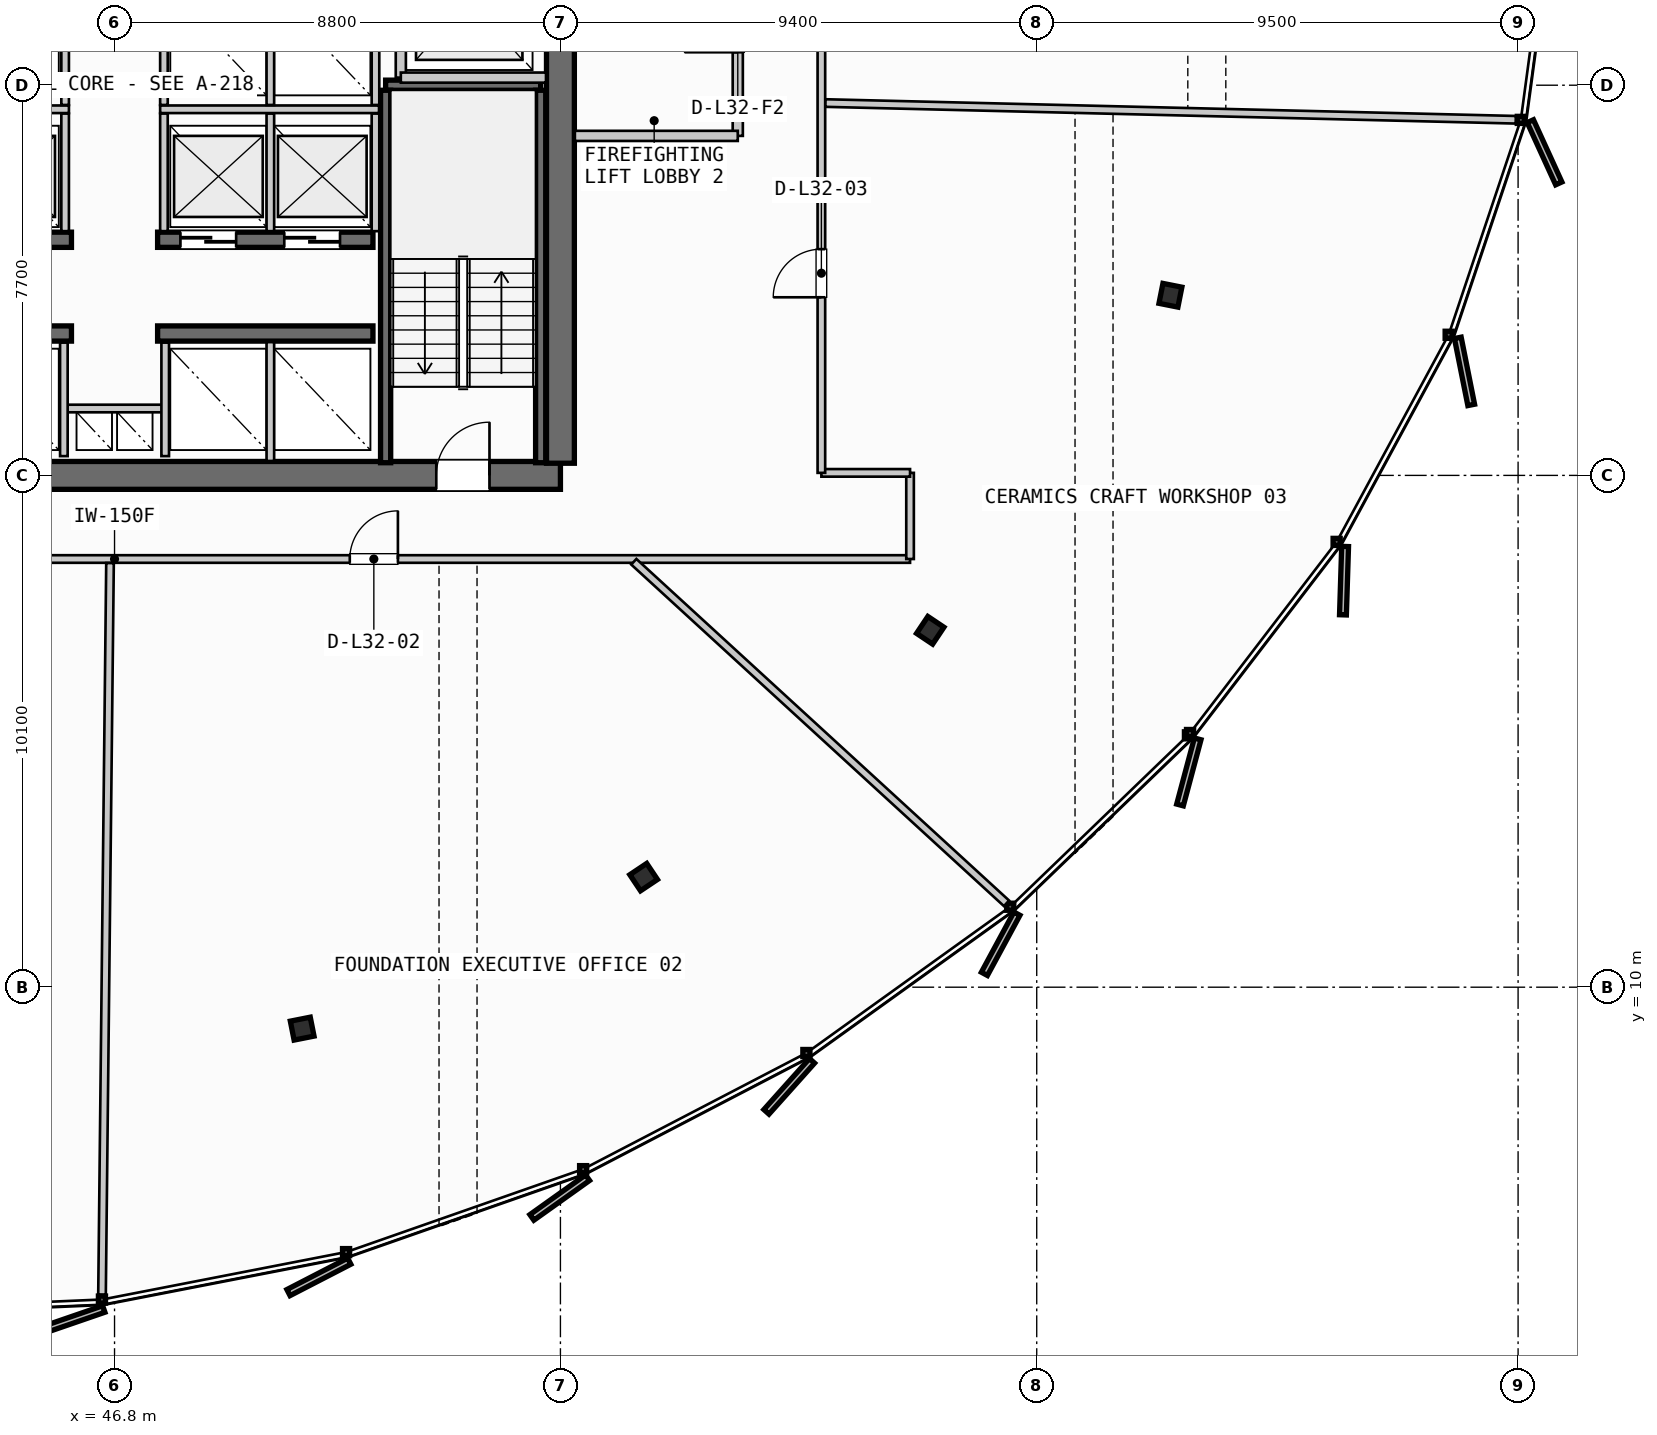
"""IFC4 building model, lengths in metres.
Left out: names, types, materials, properties, quantities, classifications, styles, units other than length and angle.
Written with IfcOpenShell. Run it as: python <this file> out.ifc"""

import sys

from ifc_helpers import new_model, si_unit, direction, frame, frame_2d, origin, origin_2d, place, context, subcontext, project, spatial, rectangle, i_section, extrude, source, transform, mapped, element, fill, save


model = new_model("IFC4")
c1 = context("Model", 3, precision=1e-05, world=origin(), true_north=direction((0.0, 1.0)))
c2 = subcontext(c1, "Body", "Model", "MODEL_VIEW")
j1 = project(units=[si_unit("LENGTHUNIT", "METRE"), si_unit("PLANEANGLEUNIT", "RADIAN")], contexts=[c1])
p1 = place(None, origin())
s1 = spatial("IfcSite", under=j1, at=p1, CompositionType="ELEMENT")
p2 = place(p1, origin())
s2 = spatial("IfcBuilding", under=s1, at=p2, CompositionType="ELEMENT")
p3 = place(p2, frame((0.0, 0.0, 128.8)))
s3 = spatial("IfcBuildingStorey", under=s2, at=p3, CompositionType="ELEMENT", Elevation=128.8)
p4 = place(p3, frame((38.0, 20.1, 0.0), z_axis=(0.0, 0.0, 1.0), x_axis=(1.0, 0.0, 0.0)))
e1 = element("IfcWall", 1, at=p4, inside=s3, PredefinedType="SHEAR", context=c2, shape_type="SweptSolid", body=[
    extrude(rectangle(XDim=17.6, YDim=0.55, at=frame_2d((8.8, 0.0))), origin(), (0.0, 0.0, 1.0), 3.3),
])
p5 = place(p4, frame((1.4, 0.0, 0.0)))
e2 = element("IfcOpeningElement", 2, at=p5, cuts=e1, PredefinedType="OPENING", context=c2, shape_type="SweptSolid", body=[
    extrude(rectangle(XDim=1.05, YDim=2.15, at=frame_2d((0.525, 1.075))), frame((0.0, 0.285, 0.0), z_axis=(0.0, -1.0, 0.0), x_axis=(1.0, 0.0, 0.0)), (0.0, 0.0, 1.0), 0.57),
])
p6 = place(p4, frame((15.15, 0.0, 0.0)))
e3 = element("IfcOpeningElement", 3, at=p6, cuts=e1, PredefinedType="OPENING", context=c2, shape_type="SweptSolid", body=[
    extrude(rectangle(XDim=1.05, YDim=2.15, at=frame_2d((0.525, 1.075))), frame((0.0, 0.285, 0.0), z_axis=(0.0, -1.0, 0.0), x_axis=(1.0, 0.0, 0.0)), (0.0, 0.0, 1.0), 0.57),
])
p7 = place(p3, frame((55.6, 20.34, 0.0), z_axis=(0.0, 0.0, 1.0), x_axis=(0.0, 1.0, 0.0)))
e4 = element("IfcWall", 4, at=p7, inside=s3, PredefinedType="SHEAR", context=c2, shape_type="SweptSolid", body=[
    extrude(rectangle(XDim=14.92, YDim=0.55, at=frame_2d((7.46, 0.0))), origin(), (0.0, 0.0, 1.0), 3.3),
])
p8 = place(p7, frame((12.71, 0.0, 0.0)))
e5 = element("IfcOpeningElement", 5, at=p8, cuts=e4, PredefinedType="OPENING", context=c2, shape_type="SweptSolid", body=[
    extrude(rectangle(XDim=1.05, YDim=2.15, at=frame_2d((0.525, 1.075))), frame((0.0, 0.285, 0.0), z_axis=(0.0, -1.0, 0.0), x_axis=(1.0, 0.0, 0.0)), (0.0, 0.0, 1.0), 0.57),
])
p9 = place(p7, frame((8.61, 0.0, 0.0)))
e6 = element("IfcOpeningElement", 6, at=p9, cuts=e4, PredefinedType="OPENING", context=c2, shape_type="SweptSolid", body=[
    extrude(rectangle(XDim=1.1, YDim=2.2, at=frame_2d((0.55, 1.1))), frame((0.0, 0.285, 0.0), z_axis=(0.0, -1.0, 0.0), x_axis=(1.0, 0.0, 0.0)), (0.0, 0.0, 1.0), 0.57),
])
for number, where, z_axis, x_axis in (
    (7, (41.7, 22.9, 0.0), (0.0, 0.0, 1.0), (1.0, 0.0, 0.0)),
    (8, (47.65, 22.9, 0.0), (0.0, 0.0, 1.0), (1.0, 0.0, 0.0)),
):
    element("IfcWall", number, at=place(p3, frame(where, z_axis=z_axis, x_axis=x_axis)), inside=s3, PredefinedType="SHEAR", context=c2, shape_type="SweptSolid", body=[
        extrude(rectangle(XDim=4.25, YDim=0.3, at=frame_2d((2.125, 0.0))), origin(), (0.0, 0.0, 1.0), 3.3),
    ])
p10 = place(p3, frame((41.7, 24.75, 0.0), z_axis=(0.0, 0.0, 1.0), x_axis=(1.0, 0.0, 0.0)))
e9 = element("IfcWall", 9, at=p10, inside=s3, PredefinedType="SHEAR", context=c2, shape_type="SweptSolid", body=[
    extrude(rectangle(XDim=4.25, YDim=0.3, at=frame_2d((2.125, 0.0))), origin(), (0.0, 0.0, 1.0), 3.3),
])
p11 = place(p10, frame((0.45, 0.0, 0.0)))
e10 = element("IfcOpeningElement", 10, at=p11, cuts=e9, PredefinedType="OPENING", context=c2, shape_type="SweptSolid", body=[
    extrude(rectangle(XDim=1.1, YDim=2.2, at=frame_2d((0.55, 1.1))), frame((0.0, 0.16, 0.0), z_axis=(0.0, -1.0, 0.0), x_axis=(1.0, 0.0, 0.0)), (0.0, 0.0, 1.0), 0.32),
])
p12 = place(p10, frame((2.5, 0.0, 0.0)))
e11 = element("IfcOpeningElement", 11, at=p12, cuts=e9, PredefinedType="OPENING", context=c2, shape_type="SweptSolid", body=[
    extrude(rectangle(XDim=1.1, YDim=2.2, at=frame_2d((0.55, 1.1))), frame((0.0, 0.16, 0.0), z_axis=(0.0, -1.0, 0.0), x_axis=(1.0, 0.0, 0.0)), (0.0, 0.0, 1.0), 0.32),
])
p13 = place(p3, frame((47.65, 24.75, 0.0), z_axis=(0.0, 0.0, 1.0), x_axis=(1.0, 0.0, 0.0)))
e12 = element("IfcWall", 12, at=p13, inside=s3, PredefinedType="SHEAR", context=c2, shape_type="SweptSolid", body=[
    extrude(rectangle(XDim=4.25, YDim=0.3, at=frame_2d((2.125, 0.0))), origin(), (0.0, 0.0, 1.0), 3.3),
])
p14 = place(p13, frame((0.45, 0.0, 0.0)))
e13 = element("IfcOpeningElement", 13, at=p14, cuts=e12, PredefinedType="OPENING", context=c2, shape_type="SweptSolid", body=[
    extrude(rectangle(XDim=1.1, YDim=2.2, at=frame_2d((0.55, 1.1))), frame((0.0, 0.16, 0.0), z_axis=(0.0, -1.0, 0.0), x_axis=(1.0, 0.0, 0.0)), (0.0, 0.0, 1.0), 0.32),
])
p15 = place(p13, frame((2.5, 0.0, 0.0)))
e14 = element("IfcOpeningElement", 14, at=p15, cuts=e12, PredefinedType="OPENING", context=c2, shape_type="SweptSolid", body=[
    extrude(rectangle(XDim=1.1, YDim=2.2, at=frame_2d((0.55, 1.1))), frame((0.0, 0.16, 0.0), z_axis=(0.0, -1.0, 0.0), x_axis=(1.0, 0.0, 0.0)), (0.0, 0.0, 1.0), 0.32),
])
m1 = source(origin(), c2, "Body", "SweptSolid", [
    extrude(i_section(OverallWidth=0.401, OverallDepth=0.381, WebThickness=0.032, FlangeThickness=0.051, FilletRadius=0.015, at=origin_2d()), origin(), (0.0, 0.0, 1.0), 3.3),
])
for number, where, z_axis, x_axis in (
    (15, (50.503, 9.182, 0.0), (0.0, 0.0, 1.0), (0.195, -0.981, 0.0)),
    (16, (57.242, 12.172, 0.0), (0.0, 0.0, 1.0), (0.556, -0.831, 0.0)),
    (17, (62.899, 17.043, 0.0), (0.0, 0.0, 1.0), (0.831, -0.556, 0.0)),
    (18, (67.639, 23.655, 0.0), (0.0, 0.0, 1.0), (0.981, -0.195, 0.0)),
):
    element("IfcColumn", number, at=place(p3, frame(where, z_axis=z_axis, x_axis=x_axis)), inside=s3, PredefinedType="COLUMN", context=c2, shape_type="MappedRepresentation", body=[
        mapped(m1, transform((0.0, 0.0, 0.0), scale=1.0)),
    ])
p16 = place(p3, frame((52.15, 27.8, 0.0), z_axis=(0.0, 0.0, 1.0), x_axis=(1.0, 0.0, 0.0)))
e19 = element("IfcWall", 19, at=p16, inside=s3, PredefinedType="SHEAR", context=c2, shape_type="SweptSolid", body=[
    extrude(rectangle(XDim=3.06, YDim=0.2, at=frame_2d((1.53, 0.0))), origin(), (0.0, 0.0, 1.0), 3.3),
])
for number, where, z_axis, x_axis in (
    (20, (55.21, 27.7, 0.0), (0.0, 0.0, 1.0), (0.0, -1.0, 0.0)),
    (21, (52.15, 20.35, 0.0), (0.0, 0.0, 1.0), (0.0, 1.0, 0.0)),
):
    element("IfcWall", number, at=place(p3, frame(where, z_axis=z_axis, x_axis=x_axis)), inside=s3, PredefinedType="SHEAR", context=c2, shape_type="SweptSolid", body=[
        extrude(rectangle(XDim=7.35, YDim=0.2, at=frame_2d((3.675, 0.0))), origin(), (0.0, 0.0, 1.0), 3.3),
    ])
p17 = place(p3, frame((45.8, 21.42, 0.0), z_axis=(0.0, 0.0, 1.0), x_axis=(1.0, 0.0, 0.0)))
e22 = element("IfcWall", 22, at=p17, inside=s3, PredefinedType="PARTITIONING", context=c2, shape_type="SweptSolid", body=[
    extrude(rectangle(XDim=2.0, YDim=0.15, at=frame_2d((1.0, 0.0))), origin(), (0.0, 0.0, 1.0), 2.445),
])
for number, where, z_axis, x_axis in (
    (23, (45.8, 20.48, 0.0), (0.0, 0.0, 1.0), (0.0, 1.0, 0.0)),
    (24, (47.8, 20.48, 0.0), (0.0, 0.0, 1.0), (0.0, 1.0, 0.0)),
):
    element("IfcWall", number, at=place(p3, frame(where, z_axis=z_axis, x_axis=x_axis)), inside=s3, PredefinedType="PARTITIONING", context=c2, shape_type="SweptSolid", body=[
        extrude(rectangle(XDim=2.24, YDim=0.15, at=frame_2d((1.12, 0.0))), origin(), (0.0, 0.0, 1.0), 2.445),
    ])
p18 = place(p3, frame((52.45, 27.95, 0.0), z_axis=(0.0, 0.0, 1.0), x_axis=(0.0, 1.0, 0.0)))
e25 = element("IfcWall", 25, at=p18, inside=s3, PredefinedType="PARTITIONING", context=c2, shape_type="SweptSolid", body=[
    extrude(rectangle(XDim=3.1, YDim=0.2, at=frame_2d((1.55, 0.0))), origin(), (0.0, 0.0, 1.0), 2.445),
])
p19 = place(p3, frame((52.45, 27.95, 0.0), z_axis=(0.0, 0.0, 1.0), x_axis=(1.0, 0.0, 0.0)))
e26 = element("IfcWall", 26, at=p19, inside=s3, PredefinedType="PARTITIONING", context=c2, shape_type="SweptSolid", body=[
    extrude(rectangle(XDim=2.865, YDim=0.2, at=frame_2d((1.433, 0.0))), origin(), (0.0, 0.0, 1.0), 2.445),
])
p20 = place(p3, frame((59.1, 26.8, 0.0), z_axis=(0.0, 0.0, 1.0), x_axis=(0.0, 1.0, 0.0)))
e27 = element("IfcWall", 27, at=p20, inside=s3, PredefinedType="PARTITIONING", context=c2, shape_type="SweptSolid", body=[
    extrude(rectangle(XDim=4.4, YDim=0.2, at=frame_2d((2.2, 0.0))), origin(), (0.0, 0.0, 1.0), 2.445),
])
p21 = place(p20, frame((1.65, 0.0, 0.0)))
e28 = element("IfcOpeningElement", 28, at=p21, cuts=e27, PredefinedType="OPENING", context=c2, shape_type="SweptSolid", body=[
    extrude(rectangle(XDim=1.05, YDim=2.15, at=frame_2d((0.525, 1.075))), frame((0.0, 0.11, 0.0), z_axis=(0.0, -1.0, 0.0), x_axis=(1.0, 0.0, 0.0)), (0.0, 0.0, 1.0), 0.22),
])
p22 = place(p3, frame((55.885, 26.8, 0.0), z_axis=(0.0, 0.0, 1.0), x_axis=(1.0, 0.0, 0.0)))
e29 = element("IfcWall", 29, at=p22, inside=s3, PredefinedType="PARTITIONING", context=c2, shape_type="SweptSolid", body=[
    extrude(rectangle(XDim=3.215, YDim=0.2, at=frame_2d((1.607, 0.0))), origin(), (0.0, 0.0, 1.0), 2.445),
])
p23 = place(p3, frame((49.875, 20.385, 0.0), z_axis=(0.0, 0.0, 1.0), x_axis=(0.0, 1.0, 0.0)))
e30 = element("IfcWall", 30, at=p23, inside=s3, PredefinedType="PARTITIONING", context=c2, shape_type="SweptSolid", body=[
    extrude(rectangle(XDim=2.345, YDim=0.15, at=frame_2d((1.172, 0.0))), origin(), (0.0, 0.0, 1.0), 2.445),
])
p24 = place(p3, frame((41.58, 27.325, 0.0), z_axis=(0.0, 0.0, 1.0), x_axis=(1.0, 0.0, 0.0)))
e31 = element("IfcWall", 31, at=p24, inside=s3, PredefinedType="PARTITIONING", context=c2, shape_type="SweptSolid", body=[
    extrude(rectangle(XDim=4.32, YDim=0.15, at=frame_2d((2.16, 0.0))), origin(), (0.0, 0.0, 1.0), 2.445),
])
p25 = place(p3, frame((47.7, 27.325, 0.0), z_axis=(0.0, 0.0, 1.0), x_axis=(1.0, 0.0, 0.0)))
e32 = element("IfcWall", 32, at=p25, inside=s3, PredefinedType="PARTITIONING", context=c2, shape_type="SweptSolid", body=[
    extrude(rectangle(XDim=4.32, YDim=0.15, at=frame_2d((2.16, 0.0))), origin(), (0.0, 0.0, 1.0), 2.445),
])
for number, where, z_axis, x_axis in (
    (33, (45.825, 24.92, 0.0), (0.0, 0.0, 1.0), (0.0, 1.0, 0.0)),
    (34, (47.775, 24.92, 0.0), (0.0, 0.0, 1.0), (0.0, 1.0, 0.0)),
    (35, (49.875, 24.92, 0.0), (0.0, 0.0, 1.0), (0.0, 1.0, 0.0)),
    (36, (51.95, 24.92, 0.0), (0.0, 0.0, 1.0), (0.0, 1.0, 0.0)),
):
    element("IfcWall", number, at=place(p3, frame(where, z_axis=z_axis, x_axis=x_axis)), inside=s3, PredefinedType="PARTITIONING", context=c2, shape_type="SweptSolid", body=[
        extrude(rectangle(XDim=2.32, YDim=0.15, at=frame_2d((1.16, 0.0))), origin(), (0.0, 0.0, 1.0), 2.445),
    ])
for number, where, z_axis, x_axis in (
    (37, (45.825, 27.41, 0.0), (0.0, 0.0, 1.0), (0.0, 1.0, 0.0)),
    (38, (47.775, 27.41, 0.0), (0.0, 0.0, 1.0), (0.0, 1.0, 0.0)),
    (39, (49.875, 27.41, 0.0), (0.0, 0.0, 1.0), (0.0, 1.0, 0.0)),
    (40, (51.95, 27.41, 0.0), (0.0, 0.0, 1.0), (0.0, 1.0, 0.0)),
):
    element("IfcWall", number, at=place(p3, frame(where, z_axis=z_axis, x_axis=x_axis)), inside=s3, PredefinedType="PARTITIONING", context=c2, shape_type="SweptSolid", body=[
        extrude(rectangle(XDim=2.27, YDim=0.15, at=frame_2d((1.135, 0.0))), origin(), (0.0, 0.0, 1.0), 2.445),
    ])
p26 = place(p3, frame((31.1, 18.45, 0.0), z_axis=(0.0, 0.0, 1.0), x_axis=(1.0, 0.0, 0.0)))
e41 = element("IfcWall", 41, at=p26, inside=s3, PredefinedType="PARTITIONING", context=c2, shape_type="SweptSolid", body=[
    extrude(rectangle(XDim=31.4, YDim=0.15, at=frame_2d((15.7, 0.0))), origin(), (0.0, 0.0, 1.0), 2.445),
])
p27 = place(p26, frame((9.534, 0.0, 0.0)))
e42 = element("IfcOpeningElement", 42, at=p27, cuts=e41, PredefinedType="OPENING", context=c2, shape_type="SweptSolid", body=[
    extrude(rectangle(XDim=0.95, YDim=2.15, at=frame_2d((0.475, 1.075))), frame((0.0, 0.085, 0.0), z_axis=(0.0, -1.0, 0.0), x_axis=(1.0, 0.0, 0.0)), (0.0, 0.0, 1.0), 0.17),
])
p28 = place(p26, frame((20.343, 0.0, 0.0)))
e43 = element("IfcOpeningElement", 43, at=p28, cuts=e41, PredefinedType="OPENING", context=c2, shape_type="SweptSolid", body=[
    extrude(rectangle(XDim=0.95, YDim=2.15, at=frame_2d((0.475, 1.075))), frame((0.0, 0.085, 0.0), z_axis=(0.0, -1.0, 0.0), x_axis=(1.0, 0.0, 0.0)), (0.0, 0.0, 1.0), 0.17),
])
p29 = place(p3, frame((62.5, 18.45, 0.0), z_axis=(0.0, 0.0, 1.0), x_axis=(0.0, 1.0, 0.0)))
e44 = element("IfcWall", 44, at=p29, inside=s3, PredefinedType="PARTITIONING", context=c2, shape_type="SweptSolid", body=[
    extrude(rectangle(XDim=1.7, YDim=0.15, at=frame_2d((0.85, 0.0))), origin(), (0.0, 0.0, 1.0), 2.445),
])
p30 = place(p3, frame((62.5, 20.15, 0.0), z_axis=(0.0, 0.0, 1.0), x_axis=(-1.0, 0.0, 0.0)))
e45 = element("IfcWall", 45, at=p30, inside=s3, PredefinedType="PARTITIONING", context=c2, shape_type="SweptSolid", body=[
    extrude(rectangle(XDim=1.75, YDim=0.15, at=frame_2d((0.875, 0.0))), origin(), (0.0, 0.0, 1.0), 2.445),
])
p31 = place(p3, frame((60.75, 20.15, 0.0), z_axis=(0.0, 0.0, 1.0), x_axis=(0.0, 1.0, 0.0)))
e46 = element("IfcWall", 46, at=p31, inside=s3, PredefinedType="PARTITIONING", context=c2, shape_type="SweptSolid", body=[
    extrude(rectangle(XDim=15.3, YDim=0.15, at=frame_2d((7.65, 0.0))), origin(), (0.0, 0.0, 1.0), 2.445),
])
p32 = place(p31, frame((3.465, 0.0, 0.0)))
e47 = element("IfcOpeningElement", 47, at=p32, cuts=e46, PredefinedType="OPENING", context=c2, shape_type="SweptSolid", body=[
    extrude(rectangle(XDim=0.95, YDim=2.15, at=frame_2d((0.475, 1.075))), frame((0.0, 0.085, 0.0), z_axis=(0.0, -1.0, 0.0), x_axis=(1.0, 0.0, 0.0)), (0.0, 0.0, 1.0), 0.17),
])
p33 = place(p31, frame((10.535, 0.0, 0.0)))
e48 = element("IfcOpeningElement", 48, at=p33, cuts=e46, PredefinedType="OPENING", context=c2, shape_type="SweptSolid", body=[
    extrude(rectangle(XDim=0.95, YDim=2.15, at=frame_2d((0.475, 1.075))), frame((0.0, 0.085, 0.0), z_axis=(0.0, -1.0, 0.0), x_axis=(1.0, 0.0, 0.0)), (0.0, 0.0, 1.0), 0.17),
])
p34 = place(p3, frame((46.711, 18.37, 0.0), z_axis=(0.0, 0.0, 1.0), x_axis=(-0.010942632521, -0.999940127604, 0.0)))
e49 = element("IfcWall", 49, at=p34, inside=s3, PredefinedType="PARTITIONING", context=c2, shape_type="SweptSolid", body=[
    extrude(rectangle(XDim=14.435, YDim=0.15, at=frame_2d((7.218, 0.0))), origin(), (0.0, 0.0, 1.0), 2.445),
])
p35 = place(p3, frame((57.048, 18.396, 0.0), z_axis=(0.0, 0.0, 1.0), x_axis=(0.737244538612, -0.675625998823, 0.0)))
e50 = element("IfcWall", 50, at=p35, inside=s3, PredefinedType="PARTITIONING", context=c2, shape_type="SweptSolid", body=[
    extrude(rectangle(XDim=9.977, YDim=0.15, at=frame_2d((4.988, 0.0))), origin(), (0.0, 0.0, 1.0), 2.445),
])
p36 = place(p3, frame((60.83, 27.448, 0.0), z_axis=(0.0, 0.0, 1.0), x_axis=(0.999707062654, -0.02420307585, 0.0)))
e51 = element("IfcWall", 51, at=p36, inside=s3, PredefinedType="PARTITIONING", context=c2, shape_type="SweptSolid", body=[
    extrude(rectangle(XDim=13.628, YDim=0.15, at=frame_2d((6.814, 0.0))), origin(), (0.0, 0.0, 1.0), 2.445),
])
m2 = source(origin(), c2, "Body", "SweptSolid", [
    extrude(rectangle(XDim=1.05, YDim=2.15, at=frame_2d((0.525, 1.075))), frame((0.0, 0.025, 0.0), z_axis=(0.0, -1.0, 0.0), x_axis=(1.0, 0.0, 0.0)), (0.0, 0.0, 1.0), 0.05),
])
p37 = place(p6, origin())
e52 = element("IfcDoor", 52, at=p37, inside=s3, OperationType="SINGLE_SWING_RIGHT", PredefinedType="DOOR", context=c2, shape_type="MappedRepresentation", body=[
    mapped(m2, transform((0.0, 0.0, 0.0), scale=1.0)),
])
fill(e3, e52)
m3 = source(origin(), c2, "Body", "SweptSolid", [
    extrude(rectangle(XDim=1.1, YDim=2.2, at=frame_2d((0.55, 1.1))), frame((0.0, 0.025, 0.0), z_axis=(0.0, -1.0, 0.0), x_axis=(1.0, 0.0, 0.0)), (0.0, 0.0, 1.0), 0.05),
])
p38 = place(p14, origin())
e53 = element("IfcDoor", 53, at=p38, inside=s3, OperationType="SLIDING_TO_RIGHT", PredefinedType="DOOR", context=c2, shape_type="MappedRepresentation", body=[
    mapped(m3, transform((0.0, 0.0, 0.0), scale=1.0)),
])
fill(e13, e53)
p39 = place(p15, origin())
e54 = element("IfcDoor", 54, at=p39, inside=s3, OperationType="SLIDING_TO_RIGHT", PredefinedType="DOOR", context=c2, shape_type="MappedRepresentation", body=[
    mapped(m3, transform((0.0, 0.0, 0.0), scale=1.0)),
])
fill(e14, e54)
p40 = place(p21, origin())
e55 = element("IfcDoor", 55, at=p40, inside=s3, OperationType="SINGLE_SWING_LEFT", PredefinedType="DOOR", context=c2, shape_type="MappedRepresentation", body=[
    mapped(m2, transform((0.0, 0.0, 0.0), scale=1.0)),
])
fill(e28, e55)
m4 = source(origin(), c2, "Body", "SweptSolid", [
    extrude(rectangle(XDim=0.95, YDim=2.15, at=frame_2d((0.475, 1.075))), frame((0.0, 0.025, 0.0), z_axis=(0.0, -1.0, 0.0), x_axis=(1.0, 0.0, 0.0)), (0.0, 0.0, 1.0), 0.05),
])
p41 = place(p28, origin())
e56 = element("IfcDoor", 56, at=p41, inside=s3, OperationType="SINGLE_SWING_RIGHT", PredefinedType="DOOR", context=c2, shape_type="MappedRepresentation", body=[
    mapped(m4, transform((0.0, 0.0, 0.0), scale=1.0)),
])
fill(e43, e56)
p42 = place(p32, origin())
e57 = element("IfcDoor", 57, at=p42, inside=s3, OperationType="SINGLE_SWING_LEFT", PredefinedType="DOOR", context=c2, shape_type="MappedRepresentation", body=[
    mapped(m4, transform((0.0, 0.0, 0.0), scale=1.0)),
])
fill(e47, e57)
save(model, sys.argv[1])
